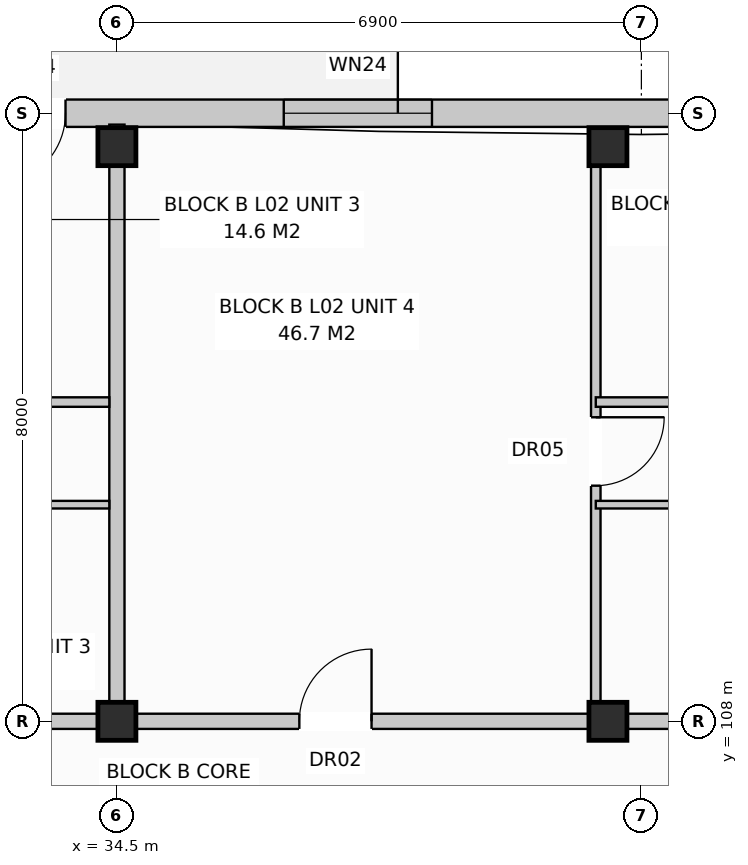
"""IFC4 building model, lengths in metres.
Left out: names, types, materials, properties, quantities, classifications, styles, units other than length and angle.
Written with IfcOpenShell. Run it as: python <this file> out.ifc"""

import sys

from ifc_helpers import new_model, si_unit, direction, frame, frame_2d, origin, origin_with_axes, origin_2d, place, context, subcontext, project, spatial, rectangle, extrude, element, fill, save


model = new_model("IFC4")
c1 = context("Model", 3, precision=1e-05, world=origin(), true_north=direction((0.0, 1.0)))
c2 = subcontext(c1, "Body", "Model", "MODEL_VIEW")
j1 = project(units=[si_unit("LENGTHUNIT", "METRE"), si_unit("PLANEANGLEUNIT", "RADIAN")], contexts=[c1])
p1 = place(None, origin())
s1 = spatial("IfcSite", under=j1, at=p1, CompositionType="ELEMENT")
p2 = place(p1, origin())
s2 = spatial("IfcBuilding", under=s1, at=p2, CompositionType="ELEMENT")
p3 = place(p2, frame((0.0, 0.0, 8.0)))
s3 = spatial("IfcBuildingStorey", under=s2, at=p3, CompositionType="ELEMENT", Elevation=8.0)
for number, where, z_axis, x_axis in (
    (1, (34.5, 108.0, 0.0), (0.0, 0.0, 1.0), (1.0, 0.0, 0.0)),
    (2, (34.5, 115.56, 0.0), (0.0, 0.0, 1.0), (1.0, 0.0, 0.0)),
    (3, (40.96, 108.0, 0.0), (0.0, 0.0, 1.0), (1.0, 0.0, 0.0)),
    (4, (40.96, 115.56, 0.0), (0.0, 0.0, 1.0), (1.0, 0.0, 0.0)),
):
    element("IfcColumn", number, at=place(p3, frame(where, z_axis=z_axis, x_axis=x_axis)), inside=s3, PredefinedType="COLUMN", context=c2, shape_type="SweptSolid", body=[
        extrude(rectangle(XDim=0.5, YDim=0.5, at=origin_2d()), origin(), (0.0, 0.0, 1.0), 3.2),
    ])
p4 = place(p3, frame((0.17, 116.0, 0.0), z_axis=(0.0, 0.0, 1.0), x_axis=(1.0, 0.0, 0.0)))
e5 = element("IfcWall", 5, at=p4, inside=s3, PredefinedType="STANDARD", context=c2, shape_type="SweptSolid", body=[
    extrude(rectangle(XDim=54.86, YDim=0.36, at=frame_2d((27.43, 0.0))), origin(), (0.0, 0.0, 1.0), 2.94),
])
p5 = place(p4, frame((5.1, 0.0, 0.0)))
e6 = element("IfcOpeningElement", 6, at=p5, cuts=e5, PredefinedType="OPENING", context=c2, shape_type="SweptSolid", body=[
    extrude(rectangle(XDim=0.95, YDim=2.1, at=frame_2d((0.475, 1.05))), frame((0.0, 0.192, 0.0), z_axis=(0.0, -1.0, 0.0), x_axis=(1.0, 0.0, 0.0)), (0.0, 0.0, 1.0), 0.384),
])
p6 = place(p4, frame((18.904, 0.0, 0.0)))
e7 = element("IfcOpeningElement", 7, at=p6, cuts=e5, PredefinedType="OPENING", context=c2, shape_type="SweptSolid", body=[
    extrude(rectangle(XDim=0.95, YDim=2.1, at=frame_2d((0.475, 1.05))), frame((0.0, 0.192, 0.0), z_axis=(0.0, -1.0, 0.0), x_axis=(1.0, 0.0, 0.0)), (0.0, 0.0, 1.0), 0.384),
])
p7 = place(p4, frame((32.704, 0.0, 0.0)))
e8 = element("IfcOpeningElement", 8, at=p7, cuts=e5, PredefinedType="OPENING", context=c2, shape_type="SweptSolid", body=[
    extrude(rectangle(XDim=0.95, YDim=2.1, at=frame_2d((0.475, 1.05))), frame((0.0, 0.192, 0.0), z_axis=(0.0, -1.0, 0.0), x_axis=(1.0, 0.0, 0.0)), (0.0, 0.0, 1.0), 0.384),
])
p8 = place(p4, frame((44.626, 0.0, 0.0)))
e9 = element("IfcOpeningElement", 9, at=p8, cuts=e5, PredefinedType="OPENING", context=c2, shape_type="SweptSolid", body=[
    extrude(rectangle(XDim=0.95, YDim=2.1, at=frame_2d((0.475, 1.05))), frame((0.0, 0.192, 0.0), z_axis=(0.0, -1.0, 0.0), x_axis=(1.0, 0.0, 0.0)), (0.0, 0.0, 1.0), 0.384),
])
p9 = place(p4, frame((1.25, 0.0, 0.72)))
e10 = element("IfcOpeningElement", 10, at=p9, cuts=e5, PredefinedType="OPENING", context=c2, shape_type="SweptSolid", body=[
    extrude(rectangle(XDim=1.1, YDim=1.5, at=frame_2d((0.55, 0.75))), frame((0.0, 0.192, 0.0), z_axis=(0.0, -1.0, 0.0), x_axis=(1.0, 0.0, 0.0)), (0.0, 0.0, 1.0), 0.384),
])
p10 = place(p4, frame((7.925, 0.0, 0.8)))
e11 = element("IfcOpeningElement", 11, at=p10, cuts=e5, PredefinedType="OPENING", context=c2, shape_type="SweptSolid", body=[
    extrude(rectangle(XDim=1.95, YDim=1.65, at=frame_2d((0.975, 0.825))), frame((0.0, 0.192, 0.0), z_axis=(0.0, -1.0, 0.0), x_axis=(1.0, 0.0, 0.0)), (0.0, 0.0, 1.0), 0.384),
])
p11 = place(p4, frame((11.65, 0.0, 0.72)))
e12 = element("IfcOpeningElement", 12, at=p11, cuts=e5, PredefinedType="OPENING", context=c2, shape_type="SweptSolid", body=[
    extrude(rectangle(XDim=1.1, YDim=1.5, at=frame_2d((0.55, 0.75))), frame((0.0, 0.192, 0.0), z_axis=(0.0, -1.0, 0.0), x_axis=(1.0, 0.0, 0.0)), (0.0, 0.0, 1.0), 0.384),
])
p12 = place(p4, frame((16.75, 0.0, 0.8)))
e13 = element("IfcOpeningElement", 13, at=p12, cuts=e5, PredefinedType="OPENING", context=c2, shape_type="SweptSolid", body=[
    extrude(rectangle(XDim=1.9, YDim=1.85, at=frame_2d((0.95, 0.925))), frame((0.0, 0.192, 0.0), z_axis=(0.0, -1.0, 0.0), x_axis=(1.0, 0.0, 0.0)), (0.0, 0.0, 1.0), 0.384),
])
p13 = place(p4, frame((22.225, 0.0, 0.8)))
e14 = element("IfcOpeningElement", 14, at=p13, cuts=e5, PredefinedType="OPENING", context=c2, shape_type="SweptSolid", body=[
    extrude(rectangle(XDim=1.95, YDim=1.65, at=frame_2d((0.975, 0.825))), frame((0.0, 0.192, 0.0), z_axis=(0.0, -1.0, 0.0), x_axis=(1.0, 0.0, 0.0)), (0.0, 0.0, 1.0), 0.384),
])
p14 = place(p4, frame((28.35, 0.0, 0.72)))
e15 = element("IfcOpeningElement", 15, at=p14, cuts=e5, PredefinedType="OPENING", context=c2, shape_type="SweptSolid", body=[
    extrude(rectangle(XDim=1.1, YDim=1.5, at=frame_2d((0.55, 0.75))), frame((0.0, 0.192, 0.0), z_axis=(0.0, -1.0, 0.0), x_axis=(1.0, 0.0, 0.0)), (0.0, 0.0, 1.0), 0.384),
])
p15 = place(p4, frame((30.55, 0.0, 0.8)))
e16 = element("IfcOpeningElement", 16, at=p15, cuts=e5, PredefinedType="OPENING", context=c2, shape_type="SweptSolid", body=[
    extrude(rectangle(XDim=1.9, YDim=1.85, at=frame_2d((0.95, 0.925))), frame((0.0, 0.192, 0.0), z_axis=(0.0, -1.0, 0.0), x_axis=(1.0, 0.0, 0.0)), (0.0, 0.0, 1.0), 0.384),
])
p16 = place(p4, frame((36.525, 0.0, 0.8)))
e17 = element("IfcOpeningElement", 17, at=p16, cuts=e5, PredefinedType="OPENING", context=c2, shape_type="SweptSolid", body=[
    extrude(rectangle(XDim=1.95, YDim=1.65, at=frame_2d((0.975, 0.825))), frame((0.0, 0.192, 0.0), z_axis=(0.0, -1.0, 0.0), x_axis=(1.0, 0.0, 0.0)), (0.0, 0.0, 1.0), 0.384),
])
p17 = place(p4, frame((42.65, 0.0, 0.72)))
e18 = element("IfcOpeningElement", 18, at=p17, cuts=e5, PredefinedType="OPENING", context=c2, shape_type="SweptSolid", body=[
    extrude(rectangle(XDim=1.1, YDim=1.5, at=frame_2d((0.55, 0.75))), frame((0.0, 0.192, 0.0), z_axis=(0.0, -1.0, 0.0), x_axis=(1.0, 0.0, 0.0)), (0.0, 0.0, 1.0), 0.384),
])
p18 = place(p4, frame((48.65, 0.0, 0.72)))
e19 = element("IfcOpeningElement", 19, at=p18, cuts=e5, PredefinedType="OPENING", context=c2, shape_type="SweptSolid", body=[
    extrude(rectangle(XDim=1.9, YDim=1.85, at=frame_2d((0.95, 0.925))), frame((0.0, 0.192, 0.0), z_axis=(0.0, -1.0, 0.0), x_axis=(1.0, 0.0, 0.0)), (0.0, 0.0, 1.0), 0.384),
])
p19 = place(p4, frame((52.45, 0.0, 0.72)))
e20 = element("IfcOpeningElement", 20, at=p19, cuts=e5, PredefinedType="OPENING", context=c2, shape_type="SweptSolid", body=[
    extrude(rectangle(XDim=1.1, YDim=1.5, at=frame_2d((0.55, 0.75))), frame((0.0, 0.192, 0.0), z_axis=(0.0, -1.0, 0.0), x_axis=(1.0, 0.0, 0.0)), (0.0, 0.0, 1.0), 0.384),
])
p20 = place(p3, frame((34.5, 108.15, 0.0), z_axis=(0.0, 0.0, 1.0), x_axis=(0.0, 1.0, 0.0)))
e21 = element("IfcWall", 21, at=p20, inside=s3, PredefinedType="PARTITIONING", context=c2, shape_type="SweptSolid", body=[
    extrude(rectangle(XDim=7.7, YDim=0.2, at=frame_2d((3.85, 0.0))), origin(), (0.0, 0.0, 1.0), 2.94),
])
p21 = place(p3, frame((20.7, 108.0, 0.0), z_axis=(0.0, 0.0, 1.0), x_axis=(1.0, 0.0, 0.0)))
e22 = element("IfcWall", 22, at=p21, inside=s3, PredefinedType="PARTITIONING", context=c2, shape_type="SweptSolid", body=[
    extrude(rectangle(XDim=13.8, YDim=0.2, at=frame_2d((6.9, 0.0))), origin(), (0.0, 0.0, 1.0), 2.38),
])
p22 = place(p21, frame((2.4, 0.0, 0.0)))
e23 = element("IfcOpeningElement", 23, at=p22, cuts=e22, PredefinedType="OPENING", context=c2, shape_type="SweptSolid", body=[
    extrude(rectangle(XDim=0.95, YDim=2.15, at=frame_2d((0.475, 1.075))), frame((0.0, 0.112, 0.0), z_axis=(0.0, -1.0, 0.0), x_axis=(1.0, 0.0, 0.0)), (0.0, 0.0, 1.0), 0.224),
])
p23 = place(p3, frame((25.9, 110.85, 0.0), z_axis=(0.0, 0.0, 1.0), x_axis=(1.0, 0.0, 0.0)))
e24 = element("IfcWall", 24, at=p23, inside=s3, PredefinedType="PARTITIONING", context=c2, shape_type="SweptSolid", body=[
    extrude(rectangle(XDim=8.5, YDim=0.1, at=frame_2d((4.25, 0.0))), origin(), (0.0, 0.0, 1.0), 2.94),
])
p24 = place(p23, frame((1.0, 0.0, 0.0)))
e25 = element("IfcOpeningElement", 25, at=p24, cuts=e24, PredefinedType="OPENING", context=c2, shape_type="SweptSolid", body=[
    extrude(rectangle(XDim=0.85, YDim=2.1, at=frame_2d((0.425, 1.05))), frame((0.0, 0.062, 0.0), z_axis=(0.0, -1.0, 0.0), x_axis=(1.0, 0.0, 0.0)), (0.0, 0.0, 1.0), 0.124),
])
p25 = place(p23, frame((3.4, 0.0, 0.0)))
e26 = element("IfcOpeningElement", 26, at=p25, cuts=e24, PredefinedType="OPENING", context=c2, shape_type="SweptSolid", body=[
    extrude(rectangle(XDim=0.85, YDim=2.05, at=frame_2d((0.425, 1.025))), frame((0.0, 0.062, 0.0), z_axis=(0.0, -1.0, 0.0), x_axis=(1.0, 0.0, 0.0)), (0.0, 0.0, 1.0), 0.124),
])
p26 = place(p23, frame((6.2, 0.0, 0.0)))
e27 = element("IfcOpeningElement", 27, at=p26, cuts=e24, PredefinedType="OPENING", context=c2, shape_type="SweptSolid", body=[
    extrude(rectangle(XDim=0.85, YDim=2.05, at=frame_2d((0.425, 1.025))), frame((0.0, 0.062, 0.0), z_axis=(0.0, -1.0, 0.0), x_axis=(1.0, 0.0, 0.0)), (0.0, 0.0, 1.0), 0.124),
])
p27 = place(p3, frame((25.9, 112.2, 0.0), z_axis=(0.0, 0.0, 1.0), x_axis=(1.0, 0.0, 0.0)))
e28 = element("IfcWall", 28, at=p27, inside=s3, PredefinedType="PARTITIONING", context=c2, shape_type="SweptSolid", body=[
    extrude(rectangle(XDim=8.5, YDim=0.125, at=frame_2d((4.25, 0.0))), origin(), (0.0, 0.0, 1.0), 2.94),
])
p28 = place(p27, frame((1.5, 0.0, 0.0)))
e29 = element("IfcOpeningElement", 29, at=p28, cuts=e28, PredefinedType="OPENING", context=c2, shape_type="SweptSolid", body=[
    extrude(rectangle(XDim=0.9, YDim=2.1, at=frame_2d((0.45, 1.05))), frame((0.0, 0.074, 0.0), z_axis=(0.0, -1.0, 0.0), x_axis=(1.0, 0.0, 0.0)), (0.0, 0.0, 1.0), 0.149),
])
p29 = place(p27, frame((5.6, 0.0, 0.0)))
e30 = element("IfcOpeningElement", 30, at=p29, cuts=e28, PredefinedType="OPENING", context=c2, shape_type="SweptSolid", body=[
    extrude(rectangle(XDim=0.9, YDim=2.1, at=frame_2d((0.45, 1.05))), frame((0.0, 0.074, 0.0), z_axis=(0.0, -1.0, 0.0), x_axis=(1.0, 0.0, 0.0)), (0.0, 0.0, 1.0), 0.149),
])
p30 = place(p3, frame((34.5, 108.0, 0.0), z_axis=(0.0, 0.0, 1.0), x_axis=(1.0, 0.0, 0.0)))
e31 = element("IfcWall", 31, at=p30, inside=s3, PredefinedType="PARTITIONING", context=c2, shape_type="SweptSolid", body=[
    extrude(rectangle(XDim=20.7, YDim=0.2, at=frame_2d((10.35, 0.0))), origin(), (0.0, 0.0, 1.0), 2.38),
])
p31 = place(p30, frame((2.4, 0.0, 0.0)))
e32 = element("IfcOpeningElement", 32, at=p31, cuts=e31, PredefinedType="OPENING", context=c2, shape_type="SweptSolid", body=[
    extrude(rectangle(XDim=0.95, YDim=2.15, at=frame_2d((0.475, 1.075))), frame((0.0, 0.112, 0.0), z_axis=(0.0, -1.0, 0.0), x_axis=(1.0, 0.0, 0.0)), (0.0, 0.0, 1.0), 0.224),
])
p32 = place(p3, frame((40.8, 108.15, 0.0), z_axis=(0.0, 0.0, 1.0), x_axis=(0.0, 1.0, 0.0)))
e33 = element("IfcWall", 33, at=p32, inside=s3, PredefinedType="PARTITIONING", context=c2, shape_type="SweptSolid", body=[
    extrude(rectangle(XDim=7.65, YDim=0.125, at=frame_2d((3.825, 0.0))), origin(), (0.0, 0.0, 1.0), 2.94),
])
p33 = place(p32, frame((2.95, 0.0, 0.0)))
e34 = element("IfcOpeningElement", 34, at=p33, cuts=e33, PredefinedType="OPENING", context=c2, shape_type="SweptSolid", body=[
    extrude(rectangle(XDim=0.9, YDim=2.1, at=frame_2d((0.45, 1.05))), frame((0.0, 0.074, 0.0), z_axis=(0.0, -1.0, 0.0), x_axis=(1.0, 0.0, 0.0)), (0.0, 0.0, 1.0), 0.149),
])
p34 = place(p3, frame((40.8, 110.85, 0.0), z_axis=(0.0, 0.0, 1.0), x_axis=(1.0, 0.0, 0.0)))
e35 = element("IfcWall", 35, at=p34, inside=s3, PredefinedType="PARTITIONING", context=c2, shape_type="SweptSolid", body=[
    extrude(rectangle(XDim=14.3, YDim=0.1, at=frame_2d((7.15, 0.0))), origin(), (0.0, 0.0, 1.0), 2.94),
])
p35 = place(p34, frame((1.6, 0.0, 0.0)))
e36 = element("IfcOpeningElement", 36, at=p35, cuts=e35, PredefinedType="OPENING", context=c2, shape_type="SweptSolid", body=[
    extrude(rectangle(XDim=0.9, YDim=2.1, at=frame_2d((0.45, 1.05))), frame((0.0, 0.062, 0.0), z_axis=(0.0, -1.0, 0.0), x_axis=(1.0, 0.0, 0.0)), (0.0, 0.0, 1.0), 0.124),
])
p36 = place(p34, frame((5.1, 0.0, 0.0)))
e37 = element("IfcOpeningElement", 37, at=p36, cuts=e35, PredefinedType="OPENING", context=c2, shape_type="SweptSolid", body=[
    extrude(rectangle(XDim=0.85, YDim=2.05, at=frame_2d((0.425, 1.025))), frame((0.0, 0.062, 0.0), z_axis=(0.0, -1.0, 0.0), x_axis=(1.0, 0.0, 0.0)), (0.0, 0.0, 1.0), 0.124),
])
p37 = place(p34, frame((8.2, 0.0, 0.0)))
e38 = element("IfcOpeningElement", 38, at=p37, cuts=e35, PredefinedType="OPENING", context=c2, shape_type="SweptSolid", body=[
    extrude(rectangle(XDim=0.85, YDim=2.05, at=frame_2d((0.425, 1.025))), frame((0.0, 0.062, 0.0), z_axis=(0.0, -1.0, 0.0), x_axis=(1.0, 0.0, 0.0)), (0.0, 0.0, 1.0), 0.124),
])
p38 = place(p34, frame((11.6, 0.0, 0.0)))
e39 = element("IfcOpeningElement", 39, at=p38, cuts=e35, PredefinedType="OPENING", context=c2, shape_type="SweptSolid", body=[
    extrude(rectangle(XDim=0.85, YDim=2.05, at=frame_2d((0.425, 1.025))), frame((0.0, 0.062, 0.0), z_axis=(0.0, -1.0, 0.0), x_axis=(1.0, 0.0, 0.0)), (0.0, 0.0, 1.0), 0.124),
])
p39 = place(p3, frame((40.8, 112.2, 0.0), z_axis=(0.0, 0.0, 1.0), x_axis=(1.0, 0.0, 0.0)))
e40 = element("IfcWall", 40, at=p39, inside=s3, PredefinedType="PARTITIONING", context=c2, shape_type="SweptSolid", body=[
    extrude(rectangle(XDim=10.4, YDim=0.125, at=frame_2d((5.2, 0.0))), origin(), (0.0, 0.0, 1.0), 2.94),
])
p40 = place(p39, frame((2.0, 0.0, 0.0)))
e41 = element("IfcOpeningElement", 41, at=p40, cuts=e40, PredefinedType="OPENING", context=c2, shape_type="SweptSolid", body=[
    extrude(rectangle(XDim=0.9, YDim=2.1, at=frame_2d((0.45, 1.05))), frame((0.0, 0.074, 0.0), z_axis=(0.0, -1.0, 0.0), x_axis=(1.0, 0.0, 0.0)), (0.0, 0.0, 1.0), 0.149),
])
p41 = place(p39, frame((7.2, 0.0, 0.0)))
e42 = element("IfcOpeningElement", 42, at=p41, cuts=e40, PredefinedType="OPENING", context=c2, shape_type="SweptSolid", body=[
    extrude(rectangle(XDim=0.9, YDim=2.1, at=frame_2d((0.45, 1.05))), frame((0.0, 0.074, 0.0), z_axis=(0.0, -1.0, 0.0), x_axis=(1.0, 0.0, 0.0)), (0.0, 0.0, 1.0), 0.149),
])
p42 = place(p7, frame((0.95, 0.0, 0.0), z_axis=(0.0, 0.0, 1.0), x_axis=(-1.0, 0.0, 0.0)))
e43 = element("IfcDoor", 43, at=p42, inside=s3, OperationType="SINGLE_SWING_LEFT", PredefinedType="DOOR", context=c2, shape_type="SweptSolid", body=[
    extrude(rectangle(XDim=0.95, YDim=2.1, at=frame_2d((0.475, 1.05))), frame((0.0, 0.025, 0.0), z_axis=(0.0, -1.0, 0.0), x_axis=(1.0, 0.0, 0.0)), (0.0, 0.0, 1.0), 0.05),
])
fill(e8, e43)
p43 = place(p16, origin_with_axes())
e44 = element("IfcWindow", 44, at=p43, inside=s3, PartitioningType="SINGLE_PANEL", PredefinedType="WINDOW", context=c2, shape_type="SweptSolid", body=[
    extrude(rectangle(XDim=1.95, YDim=1.65, at=frame_2d((0.975, 0.825))), frame((0.0, 0.03, 0.0), z_axis=(0.0, -1.0, 0.0), x_axis=(1.0, 0.0, 0.0)), (0.0, 0.0, 1.0), 0.06),
])
fill(e17, e44)
p44 = place(p31, origin_with_axes())
e45 = element("IfcDoor", 45, at=p44, inside=s3, OperationType="SINGLE_SWING_RIGHT", PredefinedType="DOOR", context=c2, shape_type="SweptSolid", body=[
    extrude(rectangle(XDim=0.95, YDim=2.15, at=frame_2d((0.475, 1.075))), frame((0.0, 0.025, 0.0), z_axis=(0.0, -1.0, 0.0), x_axis=(1.0, 0.0, 0.0)), (0.0, 0.0, 1.0), 0.05),
])
fill(e32, e45)
p45 = place(p33, frame((0.9, 0.0, 0.0), z_axis=(0.0, 0.0, 1.0), x_axis=(-1.0, 0.0, 0.0)))
e46 = element("IfcDoor", 46, at=p45, inside=s3, OperationType="SINGLE_SWING_RIGHT", PredefinedType="DOOR", context=c2, shape_type="SweptSolid", body=[
    extrude(rectangle(XDim=0.9, YDim=2.1, at=frame_2d((0.45, 1.05))), frame((0.0, 0.025, 0.0), z_axis=(0.0, -1.0, 0.0), x_axis=(1.0, 0.0, 0.0)), (0.0, 0.0, 1.0), 0.05),
])
fill(e34, e46)
save(model, sys.argv[1])
